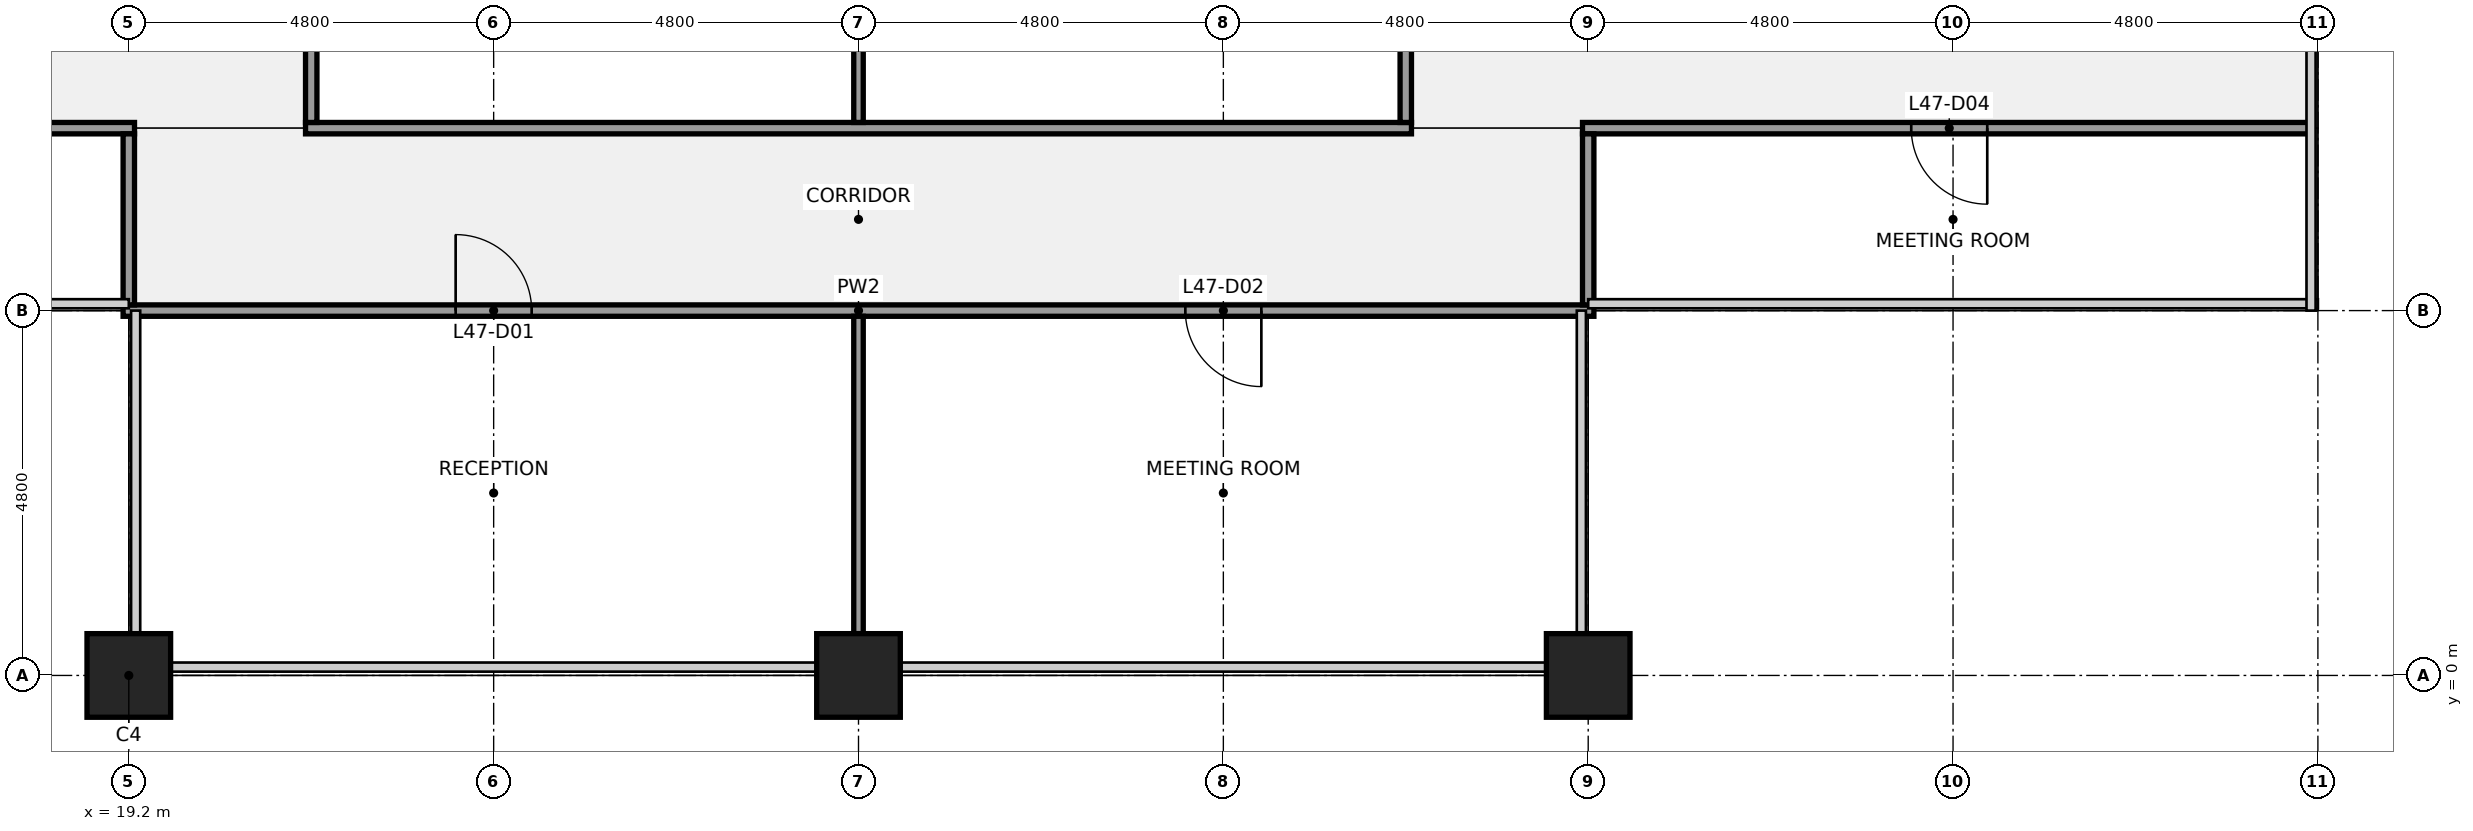
"""IFC4 building model, lengths in metres.
Left out: names, types, materials, properties, quantities, classifications, styles, units other than length and angle.
Written with IfcOpenShell. Run it as: python <this file> out.ifc"""

import sys

from ifc_helpers import new_model, si_unit, direction, frame, frame_2d, origin, origin_2d, place, context, subcontext, project, spatial, rectangle, extrude, element, fill, save


model = new_model("IFC4")
c1 = context("Model", 3, precision=1e-05, world=origin(), true_north=direction((0.0, 1.0)))
c2 = subcontext(c1, "Body", "Model", "MODEL_VIEW")
j1 = project(units=[si_unit("LENGTHUNIT", "METRE"), si_unit("PLANEANGLEUNIT", "RADIAN")], contexts=[c1])
p1 = place(None, origin())
s1 = spatial("IfcSite", under=j1, at=p1, CompositionType="ELEMENT")
p2 = place(p1, origin())
s2 = spatial("IfcBuilding", under=s1, at=p2, CompositionType="ELEMENT")
p3 = place(p2, frame((0.0, 0.0, 217.2)))
s3 = spatial("IfcBuildingStorey", under=s2, at=p3, CompositionType="ELEMENT", Elevation=217.2)
for number, where, z_axis, x_axis in (
    (1, (19.2, 0.0, 0.0), (0.0, 0.0, 1.0), (1.0, 0.0, 0.0)),
    (2, (28.8, 0.0, 0.0), (0.0, 0.0, 1.0), (1.0, 0.0, 0.0)),
    (3, (38.4, 0.0, 0.0), (0.0, 0.0, 1.0), (1.0, 0.0, 0.0)),
):
    element("IfcColumn", number, at=place(p3, frame(where, z_axis=z_axis, x_axis=x_axis)), inside=s3, PredefinedType="COLUMN", context=c2, shape_type="SweptSolid", body=[
        extrude(rectangle(XDim=1.1, YDim=1.1, at=origin_2d()), origin(), (0.0, 0.0, 1.0), 4.0),
    ])
p4 = place(p3, frame((19.125, 4.8, 0.0), z_axis=(0.0, 0.0, 1.0), x_axis=(1.0, 0.0, 0.0)))
e4 = element("IfcWall", 4, at=p4, inside=s3, PredefinedType="PARTITIONING", context=c2, shape_type="SweptSolid", body=[
    extrude(rectangle(XDim=19.35, YDim=0.15, at=frame_2d((9.675, 0.0))), origin(), (0.0, 0.0, 1.0), 2.849),
])
p5 = place(p4, frame((4.375, 0.0, 0.0)))
e5 = element("IfcOpeningElement", 5, at=p5, cuts=e4, PredefinedType="OPENING", context=c2, shape_type="SweptSolid", body=[
    extrude(rectangle(XDim=1.0, YDim=2.1, at=frame_2d((0.5, 1.05))), frame((0.0, 0.085, 0.0), z_axis=(0.0, -1.0, 0.0), x_axis=(1.0, 0.0, 0.0)), (0.0, 0.0, 1.0), 0.17),
])
p6 = place(p4, frame((13.975, 0.0, 0.0)))
e6 = element("IfcOpeningElement", 6, at=p6, cuts=e4, PredefinedType="OPENING", context=c2, shape_type="SweptSolid", body=[
    extrude(rectangle(XDim=1.0, YDim=2.1, at=frame_2d((0.5, 1.05))), frame((0.0, 0.085, 0.0), z_axis=(0.0, -1.0, 0.0), x_axis=(1.0, 0.0, 0.0)), (0.0, 0.0, 1.0), 0.17),
])
p7 = place(p3, frame((14.5, 7.2, 0.0), z_axis=(0.0, 0.0, 1.0), x_axis=(1.0, 0.0, 0.0)))
e7 = element("IfcWall", 7, at=p7, inside=s3, PredefinedType="PARTITIONING", context=c2, shape_type="SweptSolid", body=[
    extrude(rectangle(XDim=4.775, YDim=0.15, at=frame_2d((2.387, 0.0))), origin(), (0.0, 0.0, 1.0), 2.849),
])
p8 = place(p7, frame((1.85, 0.0, 0.0)))
e8 = element("IfcOpeningElement", 8, at=p8, cuts=e7, PredefinedType="OPENING", context=c2, shape_type="SweptSolid", body=[
    extrude(rectangle(XDim=1.0, YDim=2.1, at=frame_2d((0.5, 1.05))), frame((0.0, 0.085, 0.0), z_axis=(0.0, -1.0, 0.0), x_axis=(1.0, 0.0, 0.0)), (0.0, 0.0, 1.0), 0.17),
])
p9 = place(p3, frame((21.525, 7.2, 0.0), z_axis=(0.0, 0.0, 1.0), x_axis=(1.0, 0.0, 0.0)))
e9 = element("IfcWall", 9, at=p9, inside=s3, PredefinedType="PARTITIONING", context=c2, shape_type="SweptSolid", body=[
    extrude(rectangle(XDim=14.55, YDim=0.15, at=frame_2d((7.275, 0.0))), origin(), (0.0, 0.0, 1.0), 2.849),
])
p10 = place(p3, frame((38.325, 7.2, 0.0), z_axis=(0.0, 0.0, 1.0), x_axis=(1.0, 0.0, 0.0)))
e10 = element("IfcWall", 10, at=p10, inside=s3, PredefinedType="PARTITIONING", context=c2, shape_type="SweptSolid", body=[
    extrude(rectangle(XDim=9.575, YDim=0.15, at=frame_2d((4.788, 0.0))), origin(), (0.0, 0.0, 1.0), 2.849),
])
p11 = place(p10, frame((4.325, 0.0, 0.0)))
e11 = element("IfcOpeningElement", 11, at=p11, cuts=e10, PredefinedType="OPENING", context=c2, shape_type="SweptSolid", body=[
    extrude(rectangle(XDim=1.0, YDim=2.1, at=frame_2d((0.5, 1.05))), frame((0.0, 0.085, 0.0), z_axis=(0.0, -1.0, 0.0), x_axis=(1.0, 0.0, 0.0)), (0.0, 0.0, 1.0), 0.17),
])
p12 = place(p3, frame((19.2, 4.875, 0.0), z_axis=(0.0, 0.0, 1.0), x_axis=(0.0, 1.0, 0.0)))
e12 = element("IfcWall", 12, at=p12, inside=s3, PredefinedType="PARTITIONING", context=c2, shape_type="SweptSolid", body=[
    extrude(rectangle(XDim=2.25, YDim=0.15, at=frame_2d((1.125, 0.0))), origin(), (0.0, 0.0, 1.0), 2.849),
])
p13 = place(p3, frame((21.6, 7.275, 0.0), z_axis=(0.0, 0.0, 1.0), x_axis=(0.0, 1.0, 0.0)))
e13 = element("IfcWall", 13, at=p13, inside=s3, PredefinedType="PARTITIONING", context=c2, shape_type="SweptSolid", body=[
    extrude(rectangle(XDim=7.062, YDim=0.15, at=frame_2d((3.531, 0.0))), origin(), (0.0, 0.0, 1.0), 2.849),
])
p14 = place(p13, frame((3.031, 0.0, 0.0)))
e14 = element("IfcOpeningElement", 14, at=p14, cuts=e13, PredefinedType="OPENING", context=c2, shape_type="SweptSolid", body=[
    extrude(rectangle(XDim=1.0, YDim=2.1, at=frame_2d((0.5, 1.05))), frame((0.0, 0.085, 0.0), z_axis=(0.0, -1.0, 0.0), x_axis=(1.0, 0.0, 0.0)), (0.0, 0.0, 1.0), 0.17),
])
p15 = place(p3, frame((28.8, 0.55, 0.0), z_axis=(0.0, 0.0, 1.0), x_axis=(0.0, 1.0, 0.0)))
e15 = element("IfcWall", 15, at=p15, inside=s3, PredefinedType="PARTITIONING", context=c2, shape_type="SweptSolid", body=[
    extrude(rectangle(XDim=4.175, YDim=0.125, at=frame_2d((2.087, 0.0))), origin(), (0.0, 0.0, 1.0), 2.849),
])
p16 = place(p3, frame((28.8, 7.275, 0.0), z_axis=(0.0, 0.0, 1.0), x_axis=(0.0, 1.0, 0.0)))
e16 = element("IfcWall", 16, at=p16, inside=s3, PredefinedType="PARTITIONING", context=c2, shape_type="SweptSolid", body=[
    extrude(rectangle(XDim=7.062, YDim=0.125, at=frame_2d((3.531, 0.0))), origin(), (0.0, 0.0, 1.0), 2.849),
])
p17 = place(p3, frame((36.0, 7.275, 0.0), z_axis=(0.0, 0.0, 1.0), x_axis=(0.0, 1.0, 0.0)))
e17 = element("IfcWall", 17, at=p17, inside=s3, PredefinedType="PARTITIONING", context=c2, shape_type="SweptSolid", body=[
    extrude(rectangle(XDim=7.062, YDim=0.15, at=frame_2d((3.531, 0.0))), origin(), (0.0, 0.0, 1.0), 2.849),
])
p18 = place(p17, frame((3.031, 0.0, 0.0)))
e18 = element("IfcOpeningElement", 18, at=p18, cuts=e17, PredefinedType="OPENING", context=c2, shape_type="SweptSolid", body=[
    extrude(rectangle(XDim=1.0, YDim=2.1, at=frame_2d((0.5, 1.05))), frame((0.0, 0.085, 0.0), z_axis=(0.0, -1.0, 0.0), x_axis=(1.0, 0.0, 0.0)), (0.0, 0.0, 1.0), 0.17),
])
p19 = place(p3, frame((38.4, 4.875, 0.0), z_axis=(0.0, 0.0, 1.0), x_axis=(0.0, 1.0, 0.0)))
e19 = element("IfcWall", 19, at=p19, inside=s3, PredefinedType="PARTITIONING", context=c2, shape_type="SweptSolid", body=[
    extrude(rectangle(XDim=2.25, YDim=0.15, at=frame_2d((1.125, 0.0))), origin(), (0.0, 0.0, 1.0), 2.849),
])
for number, where, z_axis, x_axis in (
    (20, (19.2, -1.025, 0.0), (0.0, 0.0, 1.0), (1.0, 0.0, 0.0)),
    (21, (38.4, -1.025, 0.0), (0.0, 0.0, 1.0), (1.0, 0.0, 0.0)),
):
    element("IfcColumn", number, at=place(p3, frame(where, z_axis=z_axis, x_axis=x_axis)), inside=s3, PredefinedType="PILASTER", context=c2, shape_type="SweptSolid", body=[
        extrude(rectangle(XDim=2.4, YDim=0.95, at=origin_2d()), origin(), (0.0, 0.0, 1.0), 4.0),
    ])
p20 = place(p5, origin())
e22 = element("IfcDoor", 22, at=p20, inside=s3, OperationType="SINGLE_SWING_LEFT", PredefinedType="DOOR", context=c2, shape_type="SweptSolid", body=[
    extrude(rectangle(XDim=1.0, YDim=2.1, at=frame_2d((0.5, 1.05))), frame((0.0, 0.025, 0.0), z_axis=(0.0, -1.0, 0.0), x_axis=(1.0, 0.0, 0.0)), (0.0, 0.0, 1.0), 0.05),
])
fill(e5, e22)
p21 = place(p6, origin())
e23 = element("IfcDoor", 23, at=p21, inside=s3, OperationType="SINGLE_SWING_RIGHT", PredefinedType="DOOR", context=c2, shape_type="SweptSolid", body=[
    extrude(rectangle(XDim=1.0, YDim=2.1, at=frame_2d((0.5, 1.05))), frame((0.0, 0.025, 0.0), z_axis=(0.0, -1.0, 0.0), x_axis=(1.0, 0.0, 0.0)), (0.0, 0.0, 1.0), 0.05),
])
fill(e6, e23)
p22 = place(p11, origin())
e24 = element("IfcDoor", 24, at=p22, inside=s3, OperationType="SINGLE_SWING_RIGHT", PredefinedType="DOOR", context=c2, shape_type="SweptSolid", body=[
    extrude(rectangle(XDim=1.0, YDim=2.1, at=frame_2d((0.5, 1.05))), frame((0.0, 0.025, 0.0), z_axis=(0.0, -1.0, 0.0), x_axis=(1.0, 0.0, 0.0)), (0.0, 0.0, 1.0), 0.05),
])
fill(e11, e24)
save(model, sys.argv[1])
